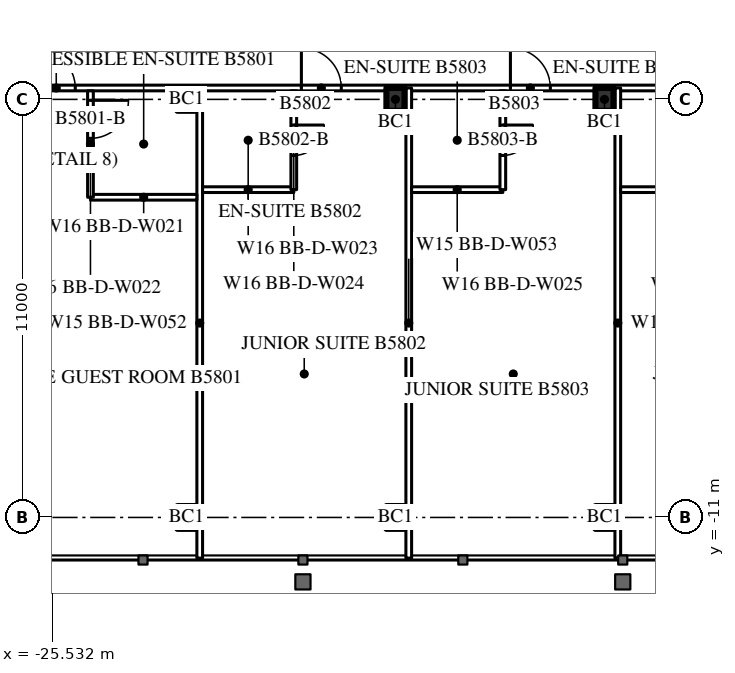
"""IFC4 building model, lengths in metres.
Left out: names, types, materials, properties, quantities, classifications, styles, units other than length and angle.
Written with IfcOpenShell. Run it as: python <this file> out.ifc"""

import sys

from ifc_helpers import new_model, si_unit, direction, frame, frame_2d, origin, origin_2d, place, context, subcontext, project, spatial, rectangle, i_section, extrude, element, fill, save


model = new_model("IFC4")
c1 = context("Model", 3, precision=1e-05, world=origin(), true_north=direction((0.0, 1.0)))
c2 = subcontext(c1, "Body", "Model", "MODEL_VIEW")
j1 = project(units=[si_unit("LENGTHUNIT", "METRE"), si_unit("PLANEANGLEUNIT", "RADIAN")], contexts=[c1])
p1 = place(None, origin())
s1 = spatial("IfcSite", under=j1, at=p1, CompositionType="ELEMENT")
p2 = place(p1, origin())
s2 = spatial("IfcBuilding", under=s1, at=p2, CompositionType="ELEMENT")
p3 = place(p2, frame((0.0, 0.0, 218.9)))
s3 = spatial("IfcBuildingStorey", under=s2, at=p3, CompositionType="ELEMENT", Elevation=218.9)
for number, where, z_axis, x_axis in (
    (1, (-22.0, -11.0, 0.0), (0.0, 0.0, 1.0), (1.0, 0.0, 0.0)),
    (2, (-16.5, -11.0, 0.0), (0.0, 0.0, 1.0), (1.0, 0.0, 0.0)),
    (3, (-11.0, -11.0, 0.0), (0.0, 0.0, 1.0), (1.0, 0.0, 0.0)),
    (4, (-22.0, 0.0, 0.0), (0.0, 0.0, 1.0), (1.0, 0.0, 0.0)),
    (5, (-16.5, 0.0, 0.0), (0.0, 0.0, 1.0), (1.0, 0.0, 0.0)),
    (6, (-11.0, 0.0, 0.0), (0.0, 0.0, 1.0), (1.0, 0.0, 0.0)),
):
    element("IfcColumn", number, at=place(p3, frame(where, z_axis=z_axis, x_axis=x_axis)), inside=s3, PredefinedType="COLUMN", context=c2, shape_type="SweptSolid", body=[
        extrude(i_section(OverallWidth=0.476, OverallDepth=0.6, WebThickness=0.1, FlangeThickness=0.14, FilletRadius=0.02, at=origin_2d()), origin(), (0.0, 0.0, 1.0), 3.6),
    ])
p4 = place(p3, frame((-27.5, 0.3, 0.0), z_axis=(0.0, 0.0, 1.0), x_axis=(1.0, 0.0, 0.0)))
e7 = element("IfcWall", 7, at=p4, inside=s3, PredefinedType="PARTITIONING", context=c2, shape_type="SweptSolid", body=[
    extrude(rectangle(XDim=55.0, YDim=0.15, at=frame_2d((27.5, 0.0))), origin(), (0.0, 0.0, 1.0), 2.4),
])
p5 = place(p4, frame((1.575, 0.0, 0.0)))
e8 = element("IfcOpeningElement", 8, at=p5, cuts=e7, PredefinedType="OPENING", context=c2, shape_type="SweptSolid", body=[
    extrude(rectangle(XDim=1.0, YDim=2.2, at=frame_2d((0.5, 1.1))), frame((0.0, 0.085, 0.0), z_axis=(0.0, -1.0, 0.0), x_axis=(1.0, 0.0, 0.0)), (0.0, 0.0, 1.0), 0.17),
])
p6 = place(p4, frame((8.525, 0.0, 0.0)))
e9 = element("IfcOpeningElement", 9, at=p6, cuts=e7, PredefinedType="OPENING", context=c2, shape_type="SweptSolid", body=[
    extrude(rectangle(XDim=1.05, YDim=2.4, at=frame_2d((0.525, 1.2))), frame((0.0, 0.085, 0.0), z_axis=(0.0, -1.0, 0.0), x_axis=(1.0, 0.0, 0.0)), (0.0, 0.0, 1.0), 0.17),
])
p7 = place(p4, frame((14.025, 0.0, 0.0)))
e10 = element("IfcOpeningElement", 10, at=p7, cuts=e7, PredefinedType="OPENING", context=c2, shape_type="SweptSolid", body=[
    extrude(rectangle(XDim=1.05, YDim=2.4, at=frame_2d((0.525, 1.2))), frame((0.0, 0.085, 0.0), z_axis=(0.0, -1.0, 0.0), x_axis=(1.0, 0.0, 0.0)), (0.0, 0.0, 1.0), 0.17),
])
p8 = place(p4, frame((19.525, 0.0, 0.0)))
e11 = element("IfcOpeningElement", 11, at=p8, cuts=e7, PredefinedType="OPENING", context=c2, shape_type="SweptSolid", body=[
    extrude(rectangle(XDim=1.05, YDim=2.4, at=frame_2d((0.525, 1.2))), frame((0.0, 0.085, 0.0), z_axis=(0.0, -1.0, 0.0), x_axis=(1.0, 0.0, 0.0)), (0.0, 0.0, 1.0), 0.17),
])
p9 = place(p4, frame((25.025, 0.0, 0.0)))
e12 = element("IfcOpeningElement", 12, at=p9, cuts=e7, PredefinedType="OPENING", context=c2, shape_type="SweptSolid", body=[
    extrude(rectangle(XDim=1.05, YDim=2.4, at=frame_2d((0.525, 1.2))), frame((0.0, 0.085, 0.0), z_axis=(0.0, -1.0, 0.0), x_axis=(1.0, 0.0, 0.0)), (0.0, 0.0, 1.0), 0.17),
])
p10 = place(p4, frame((30.525, 0.0, 0.0)))
e13 = element("IfcOpeningElement", 13, at=p10, cuts=e7, PredefinedType="OPENING", context=c2, shape_type="SweptSolid", body=[
    extrude(rectangle(XDim=1.05, YDim=2.4, at=frame_2d((0.525, 1.2))), frame((0.0, 0.085, 0.0), z_axis=(0.0, -1.0, 0.0), x_axis=(1.0, 0.0, 0.0)), (0.0, 0.0, 1.0), 0.17),
])
p11 = place(p4, frame((36.025, 0.0, 0.0)))
e14 = element("IfcOpeningElement", 14, at=p11, cuts=e7, PredefinedType="OPENING", context=c2, shape_type="SweptSolid", body=[
    extrude(rectangle(XDim=1.05, YDim=2.4, at=frame_2d((0.525, 1.2))), frame((0.0, 0.085, 0.0), z_axis=(0.0, -1.0, 0.0), x_axis=(1.0, 0.0, 0.0)), (0.0, 0.0, 1.0), 0.17),
])
p12 = place(p4, frame((41.525, 0.0, 0.0)))
e15 = element("IfcOpeningElement", 15, at=p12, cuts=e7, PredefinedType="OPENING", context=c2, shape_type="SweptSolid", body=[
    extrude(rectangle(XDim=1.05, YDim=2.4, at=frame_2d((0.525, 1.2))), frame((0.0, 0.085, 0.0), z_axis=(0.0, -1.0, 0.0), x_axis=(1.0, 0.0, 0.0)), (0.0, 0.0, 1.0), 0.17),
])
p13 = place(p4, frame((47.025, 0.0, 0.0)))
e16 = element("IfcOpeningElement", 16, at=p13, cuts=e7, PredefinedType="OPENING", context=c2, shape_type="SweptSolid", body=[
    extrude(rectangle(XDim=1.05, YDim=2.4, at=frame_2d((0.525, 1.2))), frame((0.0, 0.085, 0.0), z_axis=(0.0, -1.0, 0.0), x_axis=(1.0, 0.0, 0.0)), (0.0, 0.0, 1.0), 0.17),
])
p14 = place(p4, frame((52.525, 0.0, 0.0)))
e17 = element("IfcOpeningElement", 17, at=p14, cuts=e7, PredefinedType="OPENING", context=c2, shape_type="SweptSolid", body=[
    extrude(rectangle(XDim=1.05, YDim=2.4, at=frame_2d((0.525, 1.2))), frame((0.0, 0.085, 0.0), z_axis=(0.0, -1.0, 0.0), x_axis=(1.0, 0.0, 0.0)), (0.0, 0.0, 1.0), 0.17),
])
for number, where, z_axis, x_axis in (
    (18, (-21.65, -12.07, 0.0), (0.0, 0.0, 1.0), (0.0, 1.0, 0.0)),
    (19, (-16.15, -12.07, 0.0), (0.0, 0.0, 1.0), (0.0, 1.0, 0.0)),
    (20, (-10.65, -12.07, 0.0), (0.0, 0.0, 1.0), (0.0, 1.0, 0.0)),
):
    element("IfcWall", number, at=place(p3, frame(where, z_axis=z_axis, x_axis=x_axis)), inside=s3, PredefinedType="PARTITIONING", context=c2, shape_type="SweptSolid", body=[
        extrude(rectangle(XDim=12.37, YDim=0.15, at=frame_2d((6.185, 0.0))), origin(), (0.0, 0.0, 1.0), 3.4),
    ])
p15 = place(p3, frame((-24.525, -2.575, 0.0), z_axis=(0.0, 0.0, 1.0), x_axis=(1.0, 0.0, 0.0)))
e21 = element("IfcWall", 21, at=p15, inside=s3, PredefinedType="PARTITIONING", context=c2, shape_type="SweptSolid", body=[
    extrude(rectangle(XDim=2.8, YDim=0.15, at=frame_2d((1.4, 0.0))), origin(), (0.0, 0.0, 1.0), 3.4),
])
p16 = place(p3, frame((-24.525, -2.575, 0.0), z_axis=(0.0, 0.0, 1.0), x_axis=(0.0, 1.0, 0.0)))
e22 = element("IfcWall", 22, at=p16, inside=s3, PredefinedType="PARTITIONING", context=c2, shape_type="SweptSolid", body=[
    extrude(rectangle(XDim=2.8, YDim=0.15, at=frame_2d((1.4, 0.0))), origin(), (0.0, 0.0, 1.0), 3.4),
])
p17 = place(p16, frame((1.55, 0.0, 0.0)))
e23 = element("IfcOpeningElement", 23, at=p17, cuts=e22, PredefinedType="OPENING", context=c2, shape_type="SweptSolid", body=[
    extrude(rectangle(XDim=1.0, YDim=2.2, at=frame_2d((0.5, 1.1))), frame((0.0, 0.085, 0.0), z_axis=(0.0, -1.0, 0.0), x_axis=(1.0, 0.0, 0.0)), (0.0, 0.0, 1.0), 0.17),
])
p18 = place(p3, frame((-21.575, -2.375, 0.0), z_axis=(0.0, 0.0, 1.0), x_axis=(1.0, 0.0, 0.0)))
e24 = element("IfcWall", 24, at=p18, inside=s3, PredefinedType="PARTITIONING", context=c2, shape_type="SweptSolid", body=[
    extrude(rectangle(XDim=2.4, YDim=0.15, at=frame_2d((1.2, 0.0))), origin(), (0.0, 0.0, 1.0), 3.4),
])
p19 = place(p3, frame((-19.175, -2.375, 0.0), z_axis=(0.0, 0.0, 1.0), x_axis=(0.0, 1.0, 0.0)))
e25 = element("IfcWall", 25, at=p19, inside=s3, PredefinedType="PARTITIONING", context=c2, shape_type="SweptSolid", body=[
    extrude(rectangle(XDim=2.6, YDim=0.15, at=frame_2d((1.3, 0.0))), origin(), (0.0, 0.0, 1.0), 3.4),
])
p20 = place(p19, frame((0.9, 0.0, 0.0)))
e26 = element("IfcOpeningElement", 26, at=p20, cuts=e25, PredefinedType="OPENING", context=c2, shape_type="SweptSolid", body=[
    extrude(rectangle(XDim=0.8, YDim=2.2, at=frame_2d((0.4, 1.1))), frame((0.0, 0.085, 0.0), z_axis=(0.0, -1.0, 0.0), x_axis=(1.0, 0.0, 0.0)), (0.0, 0.0, 1.0), 0.17),
])
p21 = place(p3, frame((-16.075, -2.375, 0.0), z_axis=(0.0, 0.0, 1.0), x_axis=(1.0, 0.0, 0.0)))
e27 = element("IfcWall", 27, at=p21, inside=s3, PredefinedType="PARTITIONING", context=c2, shape_type="SweptSolid", body=[
    extrude(rectangle(XDim=2.4, YDim=0.15, at=frame_2d((1.2, 0.0))), origin(), (0.0, 0.0, 1.0), 3.4),
])
p22 = place(p3, frame((-13.675, -2.375, 0.0), z_axis=(0.0, 0.0, 1.0), x_axis=(0.0, 1.0, 0.0)))
e28 = element("IfcWall", 28, at=p22, inside=s3, PredefinedType="PARTITIONING", context=c2, shape_type="SweptSolid", body=[
    extrude(rectangle(XDim=2.6, YDim=0.15, at=frame_2d((1.3, 0.0))), origin(), (0.0, 0.0, 1.0), 3.4),
])
p23 = place(p22, frame((0.9, 0.0, 0.0)))
e29 = element("IfcOpeningElement", 29, at=p23, cuts=e28, PredefinedType="OPENING", context=c2, shape_type="SweptSolid", body=[
    extrude(rectangle(XDim=0.8, YDim=2.2, at=frame_2d((0.4, 1.1))), frame((0.0, 0.085, 0.0), z_axis=(0.0, -1.0, 0.0), x_axis=(1.0, 0.0, 0.0)), (0.0, 0.0, 1.0), 0.17),
])
p24 = place(p3, frame((-10.575, -2.375, 0.0), z_axis=(0.0, 0.0, 1.0), x_axis=(1.0, 0.0, 0.0)))
e30 = element("IfcWall", 30, at=p24, inside=s3, PredefinedType="PARTITIONING", context=c2, shape_type="SweptSolid", body=[
    extrude(rectangle(XDim=2.4, YDim=0.15, at=frame_2d((1.2, 0.0))), origin(), (0.0, 0.0, 1.0), 3.4),
])
p25 = place(p17, origin())
e31 = element("IfcDoor", 31, at=p25, inside=s3, OperationType="SINGLE_SWING_RIGHT", PredefinedType="DOOR", context=c2, shape_type="SweptSolid", body=[
    extrude(rectangle(XDim=1.0, YDim=2.2, at=frame_2d((0.5, 1.1))), frame((0.0, 0.025, 0.0), z_axis=(0.0, -1.0, 0.0), x_axis=(1.0, 0.0, 0.0)), (0.0, 0.0, 1.0), 0.05),
])
fill(e23, e31)
p26 = place(p5, origin())
e32 = element("IfcDoor", 32, at=p26, inside=s3, OperationType="SINGLE_SWING_LEFT", PredefinedType="DOOR", context=c2, shape_type="SweptSolid", body=[
    extrude(rectangle(XDim=1.0, YDim=2.2, at=frame_2d((0.5, 1.1))), frame((0.0, 0.025, 0.0), z_axis=(0.0, -1.0, 0.0), x_axis=(1.0, 0.0, 0.0)), (0.0, 0.0, 1.0), 0.05),
])
fill(e8, e32)
p27 = place(p20, origin())
e33 = element("IfcDoor", 33, at=p27, inside=s3, OperationType="SINGLE_SWING_RIGHT", PredefinedType="DOOR", context=c2, shape_type="SweptSolid", body=[
    extrude(rectangle(XDim=0.8, YDim=2.2, at=frame_2d((0.4, 1.1))), frame((0.0, 0.025, 0.0), z_axis=(0.0, -1.0, 0.0), x_axis=(1.0, 0.0, 0.0)), (0.0, 0.0, 1.0), 0.05),
])
fill(e26, e33)
p28 = place(p6, origin())
e34 = element("IfcDoor", 34, at=p28, inside=s3, OperationType="SINGLE_SWING_LEFT", PredefinedType="DOOR", context=c2, shape_type="SweptSolid", body=[
    extrude(rectangle(XDim=1.05, YDim=2.4, at=frame_2d((0.525, 1.2))), frame((0.0, 0.025, 0.0), z_axis=(0.0, -1.0, 0.0), x_axis=(1.0, 0.0, 0.0)), (0.0, 0.0, 1.0), 0.05),
])
fill(e9, e34)
p29 = place(p23, origin())
e35 = element("IfcDoor", 35, at=p29, inside=s3, OperationType="SINGLE_SWING_RIGHT", PredefinedType="DOOR", context=c2, shape_type="SweptSolid", body=[
    extrude(rectangle(XDim=0.8, YDim=2.2, at=frame_2d((0.4, 1.1))), frame((0.0, 0.025, 0.0), z_axis=(0.0, -1.0, 0.0), x_axis=(1.0, 0.0, 0.0)), (0.0, 0.0, 1.0), 0.05),
])
fill(e29, e35)
p30 = place(p7, origin())
e36 = element("IfcDoor", 36, at=p30, inside=s3, OperationType="SINGLE_SWING_LEFT", PredefinedType="DOOR", context=c2, shape_type="SweptSolid", body=[
    extrude(rectangle(XDim=1.05, YDim=2.4, at=frame_2d((0.525, 1.2))), frame((0.0, 0.025, 0.0), z_axis=(0.0, -1.0, 0.0), x_axis=(1.0, 0.0, 0.0)), (0.0, 0.0, 1.0), 0.05),
])
fill(e10, e36)
save(model, sys.argv[1])
